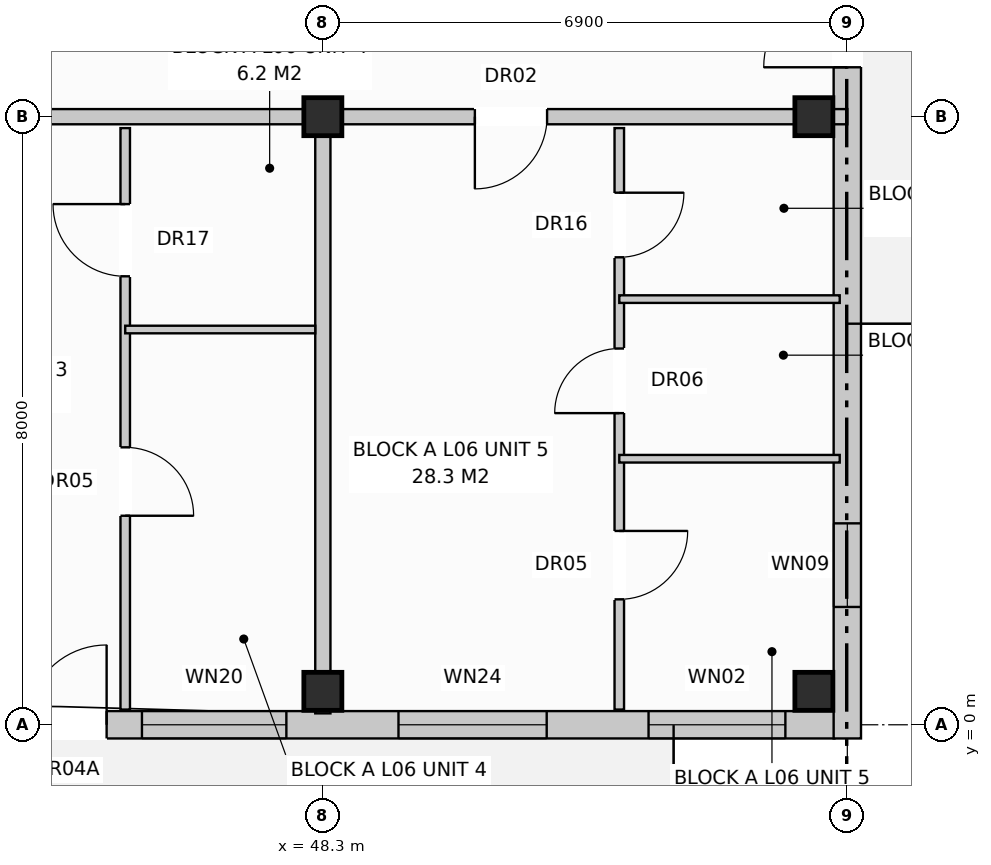
"""IFC4 building model, lengths in metres.
Left out: names, types, materials, properties, quantities, classifications, styles, units other than length and angle.
Written with IfcOpenShell. Run it as: python <this file> out.ifc"""

import sys

from ifc_helpers import new_model, si_unit, direction, frame, frame_2d, origin, origin_with_axes, origin_2d, place, context, subcontext, project, spatial, rectangle, extrude, element, fill, save


model = new_model("IFC4")
c1 = context("Model", 3, precision=1e-05, world=origin(), true_north=direction((0.0, 1.0)))
c2 = subcontext(c1, "Body", "Model", "MODEL_VIEW")
j1 = project(units=[si_unit("LENGTHUNIT", "METRE"), si_unit("PLANEANGLEUNIT", "RADIAN")], contexts=[c1])
p1 = place(None, origin())
s1 = spatial("IfcSite", under=j1, at=p1, CompositionType="ELEMENT")
p2 = place(p1, origin())
s2 = spatial("IfcBuilding", under=s1, at=p2, CompositionType="ELEMENT")
p3 = place(p2, frame((0.0, 0.0, 20.8)))
s3 = spatial("IfcBuildingStorey", under=s2, at=p3, CompositionType="ELEMENT", Elevation=20.8)
for number, where, z_axis, x_axis in (
    (1, (48.3, 0.44, 0.0), (0.0, 0.0, 1.0), (1.0, 0.0, 0.0)),
    (2, (48.3, 8.0, 0.0), (0.0, 0.0, 1.0), (1.0, 0.0, 0.0)),
    (3, (54.76, 0.44, 0.0), (0.0, 0.0, 1.0), (1.0, 0.0, 0.0)),
    (4, (54.76, 8.0, 0.0), (0.0, 0.0, 1.0), (1.0, 0.0, 0.0)),
):
    element("IfcColumn", number, at=place(p3, frame(where, z_axis=z_axis, x_axis=x_axis)), inside=s3, PredefinedType="COLUMN", context=c2, shape_type="SweptSolid", body=[
        extrude(rectangle(XDim=0.5, YDim=0.5, at=origin_2d()), origin(), (0.0, 0.0, 1.0), 3.2),
    ])
p4 = place(p3, frame((0.17, 0.0, 0.0), z_axis=(0.0, 0.0, 1.0), x_axis=(1.0, 0.0, 0.0)))
e5 = element("IfcWall", 5, at=p4, inside=s3, PredefinedType="STANDARD", context=c2, shape_type="SweptSolid", body=[
    extrude(rectangle(XDim=54.86, YDim=0.36, at=frame_2d((27.43, 0.0))), origin(), (0.0, 0.0, 1.0), 2.95),
])
p5 = place(p4, frame((4.862, 0.0, 0.0)))
e6 = element("IfcOpeningElement", 6, at=p5, cuts=e5, PredefinedType="OPENING", context=c2, shape_type="SweptSolid", body=[
    extrude(rectangle(XDim=1.05, YDim=2.12, at=frame_2d((0.525, 1.06))), frame((0.0, 0.192, 0.0), z_axis=(0.0, -1.0, 0.0), x_axis=(1.0, 0.0, 0.0)), (0.0, 0.0, 1.0), 0.384),
])
p6 = place(p4, frame((15.262, 0.0, 0.0)))
e7 = element("IfcOpeningElement", 7, at=p6, cuts=e5, PredefinedType="OPENING", context=c2, shape_type="SweptSolid", body=[
    extrude(rectangle(XDim=1.05, YDim=2.12, at=frame_2d((0.525, 1.06))), frame((0.0, 0.192, 0.0), z_axis=(0.0, -1.0, 0.0), x_axis=(1.0, 0.0, 0.0)), (0.0, 0.0, 1.0), 0.384),
])
p7 = place(p4, frame((31.362, 0.0, 0.0)))
e8 = element("IfcOpeningElement", 8, at=p7, cuts=e5, PredefinedType="OPENING", context=c2, shape_type="SweptSolid", body=[
    extrude(rectangle(XDim=1.05, YDim=2.12, at=frame_2d((0.525, 1.06))), frame((0.0, 0.192, 0.0), z_axis=(0.0, -1.0, 0.0), x_axis=(1.0, 0.0, 0.0)), (0.0, 0.0, 1.0), 0.384),
])
p8 = place(p4, frame((44.235, 0.0, 0.0)))
e9 = element("IfcOpeningElement", 9, at=p8, cuts=e5, PredefinedType="OPENING", context=c2, shape_type="SweptSolid", body=[
    extrude(rectangle(XDim=1.05, YDim=2.12, at=frame_2d((0.525, 1.06))), frame((0.0, 0.192, 0.0), z_axis=(0.0, -1.0, 0.0), x_axis=(1.0, 0.0, 0.0)), (0.0, 0.0, 1.0), 0.384),
])
p9 = place(p4, frame((2.1, 0.0, 0.8)))
e10 = element("IfcOpeningElement", 10, at=p9, cuts=e5, PredefinedType="OPENING", context=c2, shape_type="SweptSolid", body=[
    extrude(rectangle(XDim=1.8, YDim=1.7, at=frame_2d((0.9, 0.85))), frame((0.0, 0.192, 0.0), z_axis=(0.0, -1.0, 0.0), x_axis=(1.0, 0.0, 0.0)), (0.0, 0.0, 1.0), 0.384),
])
p10 = place(p4, frame((7.75, 0.0, 0.72)))
e11 = element("IfcOpeningElement", 11, at=p10, cuts=e5, PredefinedType="OPENING", context=c2, shape_type="SweptSolid", body=[
    extrude(rectangle(XDim=1.9, YDim=1.85, at=frame_2d((0.95, 0.925))), frame((0.0, 0.192, 0.0), z_axis=(0.0, -1.0, 0.0), x_axis=(1.0, 0.0, 0.0)), (0.0, 0.0, 1.0), 0.384),
])
p11 = place(p4, frame((11.8, 0.0, 0.72)))
e12 = element("IfcOpeningElement", 12, at=p11, cuts=e5, PredefinedType="OPENING", context=c2, shape_type="SweptSolid", body=[
    extrude(rectangle(XDim=1.1, YDim=1.5, at=frame_2d((0.55, 0.75))), frame((0.0, 0.192, 0.0), z_axis=(0.0, -1.0, 0.0), x_axis=(1.0, 0.0, 0.0)), (0.0, 0.0, 1.0), 0.384),
])
p12 = place(p4, frame((17.6, 0.0, 0.8)))
e13 = element("IfcOpeningElement", 13, at=p12, cuts=e5, PredefinedType="OPENING", context=c2, shape_type="SweptSolid", body=[
    extrude(rectangle(XDim=1.8, YDim=1.7, at=frame_2d((0.9, 0.85))), frame((0.0, 0.192, 0.0), z_axis=(0.0, -1.0, 0.0), x_axis=(1.0, 0.0, 0.0)), (0.0, 0.0, 1.0), 0.384),
])
p13 = place(p4, frame((21.55, 0.0, 0.72)))
e14 = element("IfcOpeningElement", 14, at=p13, cuts=e5, PredefinedType="OPENING", context=c2, shape_type="SweptSolid", body=[
    extrude(rectangle(XDim=1.9, YDim=1.85, at=frame_2d((0.95, 0.925))), frame((0.0, 0.192, 0.0), z_axis=(0.0, -1.0, 0.0), x_axis=(1.0, 0.0, 0.0)), (0.0, 0.0, 1.0), 0.384),
])
p14 = place(p4, frame((25.35, 0.0, 0.72)))
e15 = element("IfcOpeningElement", 15, at=p14, cuts=e5, PredefinedType="OPENING", context=c2, shape_type="SweptSolid", body=[
    extrude(rectangle(XDim=1.1, YDim=1.5, at=frame_2d((0.55, 0.75))), frame((0.0, 0.192, 0.0), z_axis=(0.0, -1.0, 0.0), x_axis=(1.0, 0.0, 0.0)), (0.0, 0.0, 1.0), 0.384),
])
p15 = place(p4, frame((29.2, 0.0, 0.8)))
e16 = element("IfcOpeningElement", 16, at=p15, cuts=e5, PredefinedType="OPENING", context=c2, shape_type="SweptSolid", body=[
    extrude(rectangle(XDim=1.8, YDim=1.7, at=frame_2d((0.9, 0.85))), frame((0.0, 0.192, 0.0), z_axis=(0.0, -1.0, 0.0), x_axis=(1.0, 0.0, 0.0)), (0.0, 0.0, 1.0), 0.384),
])
p16 = place(p4, frame((34.833, 0.0, 0.72)))
e17 = element("IfcOpeningElement", 17, at=p16, cuts=e5, PredefinedType="OPENING", context=c2, shape_type="SweptSolid", body=[
    extrude(rectangle(XDim=1.9, YDim=1.85, at=frame_2d((0.95, 0.925))), frame((0.0, 0.192, 0.0), z_axis=(0.0, -1.0, 0.0), x_axis=(1.0, 0.0, 0.0)), (0.0, 0.0, 1.0), 0.384),
])
p17 = place(p4, frame((38.025, 0.0, 0.8)))
e18 = element("IfcOpeningElement", 18, at=p17, cuts=e5, PredefinedType="OPENING", context=c2, shape_type="SweptSolid", body=[
    extrude(rectangle(XDim=1.95, YDim=1.65, at=frame_2d((0.975, 0.825))), frame((0.0, 0.192, 0.0), z_axis=(0.0, -1.0, 0.0), x_axis=(1.0, 0.0, 0.0)), (0.0, 0.0, 1.0), 0.384),
])
p18 = place(p4, frame((42.1, 0.0, 0.8)))
e19 = element("IfcOpeningElement", 19, at=p18, cuts=e5, PredefinedType="OPENING", context=c2, shape_type="SweptSolid", body=[
    extrude(rectangle(XDim=1.8, YDim=1.7, at=frame_2d((0.9, 0.85))), frame((0.0, 0.192, 0.0), z_axis=(0.0, -1.0, 0.0), x_axis=(1.0, 0.0, 0.0)), (0.0, 0.0, 1.0), 0.384),
])
p19 = place(p4, frame((45.75, 0.0, 0.72)))
e20 = element("IfcOpeningElement", 20, at=p19, cuts=e5, PredefinedType="OPENING", context=c2, shape_type="SweptSolid", body=[
    extrude(rectangle(XDim=1.9, YDim=1.85, at=frame_2d((0.95, 0.925))), frame((0.0, 0.192, 0.0), z_axis=(0.0, -1.0, 0.0), x_axis=(1.0, 0.0, 0.0)), (0.0, 0.0, 1.0), 0.384),
])
p20 = place(p4, frame((49.125, 0.0, 0.8)))
e21 = element("IfcOpeningElement", 21, at=p20, cuts=e5, PredefinedType="OPENING", context=c2, shape_type="SweptSolid", body=[
    extrude(rectangle(XDim=1.95, YDim=1.65, at=frame_2d((0.975, 0.825))), frame((0.0, 0.192, 0.0), z_axis=(0.0, -1.0, 0.0), x_axis=(1.0, 0.0, 0.0)), (0.0, 0.0, 1.0), 0.384),
])
p21 = place(p4, frame((52.415, 0.0, 0.8)))
e22 = element("IfcOpeningElement", 22, at=p21, cuts=e5, PredefinedType="OPENING", context=c2, shape_type="SweptSolid", body=[
    extrude(rectangle(XDim=1.8, YDim=1.7, at=frame_2d((0.9, 0.85))), frame((0.0, 0.192, 0.0), z_axis=(0.0, -1.0, 0.0), x_axis=(1.0, 0.0, 0.0)), (0.0, 0.0, 1.0), 0.384),
])
p22 = place(p3, frame((55.2, -0.18, 0.0), z_axis=(0.0, 0.0, 1.0), x_axis=(0.0, 1.0, 0.0)))
e23 = element("IfcWall", 23, at=p22, inside=s3, PredefinedType="STANDARD", context=c2, shape_type="SweptSolid", body=[
    extrude(rectangle(XDim=18.76, YDim=0.36, at=frame_2d((9.38, 0.0))), origin(), (0.0, 0.0, 1.0), 2.95),
])
p23 = place(p22, frame((8.83, 0.0, 0.0)))
e24 = element("IfcOpeningElement", 24, at=p23, cuts=e23, PredefinedType="OPENING", context=c2, shape_type="SweptSolid", body=[
    extrude(rectangle(XDim=1.1, YDim=2.1, at=frame_2d((0.55, 1.05))), frame((0.0, 0.192, 0.0), z_axis=(0.0, -1.0, 0.0), x_axis=(1.0, 0.0, 0.0)), (0.0, 0.0, 1.0), 0.384),
])
p24 = place(p22, frame((1.73, 0.0, 0.72)))
e25 = element("IfcOpeningElement", 25, at=p24, cuts=e23, PredefinedType="OPENING", context=c2, shape_type="SweptSolid", body=[
    extrude(rectangle(XDim=1.1, YDim=1.5, at=frame_2d((0.55, 0.75))), frame((0.0, 0.192, 0.0), z_axis=(0.0, -1.0, 0.0), x_axis=(1.0, 0.0, 0.0)), (0.0, 0.0, 1.0), 0.384),
])
p25 = place(p22, frame((15.93, 0.0, 0.72)))
e26 = element("IfcOpeningElement", 26, at=p25, cuts=e23, PredefinedType="OPENING", context=c2, shape_type="SweptSolid", body=[
    extrude(rectangle(XDim=1.1, YDim=1.5, at=frame_2d((0.55, 0.75))), frame((0.0, 0.192, 0.0), z_axis=(0.0, -1.0, 0.0), x_axis=(1.0, 0.0, 0.0)), (0.0, 0.0, 1.0), 0.384),
])
p26 = place(p3, frame((48.3, 7.85, 0.0), z_axis=(0.0, 0.0, 1.0), x_axis=(0.0, -1.0, 0.0)))
e27 = element("IfcWall", 27, at=p26, inside=s3, PredefinedType="PARTITIONING", context=c2, shape_type="SweptSolid", body=[
    extrude(rectangle(XDim=7.7, YDim=0.2, at=frame_2d((3.85, 0.0))), origin(), (0.0, 0.0, 1.0), 2.39),
])
p27 = place(p3, frame((41.4, 8.0, 0.0), z_axis=(0.0, 0.0, 1.0), x_axis=(1.0, 0.0, 0.0)))
e28 = element("IfcWall", 28, at=p27, inside=s3, PredefinedType="PARTITIONING", context=c2, shape_type="SweptSolid", body=[
    extrude(rectangle(XDim=6.9, YDim=0.2, at=frame_2d((3.45, 0.0))), origin(), (0.0, 0.0, 1.0), 2.39),
])
p28 = place(p27, frame((2.0, 0.0, 0.0)))
e29 = element("IfcOpeningElement", 29, at=p28, cuts=e28, PredefinedType="OPENING", context=c2, shape_type="SweptSolid", body=[
    extrude(rectangle(XDim=0.95, YDim=2.15, at=frame_2d((0.475, 1.075))), frame((0.0, 0.112, 0.0), z_axis=(0.0, -1.0, 0.0), x_axis=(1.0, 0.0, 0.0)), (0.0, 0.0, 1.0), 0.224),
])
p29 = place(p3, frame((45.7, 7.85, 0.0), z_axis=(0.0, 0.0, 1.0), x_axis=(0.0, -1.0, 0.0)))
e30 = element("IfcWall", 30, at=p29, inside=s3, PredefinedType="PARTITIONING", context=c2, shape_type="SweptSolid", body=[
    extrude(rectangle(XDim=7.65, YDim=0.125, at=frame_2d((3.825, 0.0))), origin(), (0.0, 0.0, 1.0), 2.95),
])
p30 = place(p29, frame((1.0, 0.0, 0.0)))
e31 = element("IfcOpeningElement", 31, at=p30, cuts=e30, PredefinedType="OPENING", context=c2, shape_type="SweptSolid", body=[
    extrude(rectangle(XDim=0.95, YDim=2.1, at=frame_2d((0.475, 1.05))), frame((0.0, 0.074, 0.0), z_axis=(0.0, -1.0, 0.0), x_axis=(1.0, 0.0, 0.0)), (0.0, 0.0, 1.0), 0.149),
])
p31 = place(p29, frame((4.2, 0.0, 0.0)))
e32 = element("IfcOpeningElement", 32, at=p31, cuts=e30, PredefinedType="OPENING", context=c2, shape_type="SweptSolid", body=[
    extrude(rectangle(XDim=0.9, YDim=2.1, at=frame_2d((0.45, 1.05))), frame((0.0, 0.074, 0.0), z_axis=(0.0, -1.0, 0.0), x_axis=(1.0, 0.0, 0.0)), (0.0, 0.0, 1.0), 0.149),
])
p32 = place(p3, frame((45.7, 5.2, 0.0), z_axis=(0.0, 0.0, 1.0), x_axis=(1.0, 0.0, 0.0)))
e33 = element("IfcWall", 33, at=p32, inside=s3, PredefinedType="PARTITIONING", context=c2, shape_type="SweptSolid", body=[
    extrude(rectangle(XDim=2.5, YDim=0.1, at=frame_2d((1.25, 0.0))), origin(), (0.0, 0.0, 1.0), 2.95),
])
p33 = place(p3, frame((48.3, 8.0, 0.0), z_axis=(0.0, 0.0, 1.0), x_axis=(1.0, 0.0, 0.0)))
e34 = element("IfcWall", 34, at=p33, inside=s3, PredefinedType="PARTITIONING", context=c2, shape_type="SweptSolid", body=[
    extrude(rectangle(XDim=6.9, YDim=0.2, at=frame_2d((3.45, 0.0))), origin(), (0.0, 0.0, 1.0), 2.39),
])
p34 = place(p33, frame((2.0, 0.0, 0.0)))
e35 = element("IfcOpeningElement", 35, at=p34, cuts=e34, PredefinedType="OPENING", context=c2, shape_type="SweptSolid", body=[
    extrude(rectangle(XDim=0.95, YDim=2.15, at=frame_2d((0.475, 1.075))), frame((0.0, 0.112, 0.0), z_axis=(0.0, -1.0, 0.0), x_axis=(1.0, 0.0, 0.0)), (0.0, 0.0, 1.0), 0.224),
])
p35 = place(p3, frame((52.2, 7.85, 0.0), z_axis=(0.0, 0.0, 1.0), x_axis=(0.0, -1.0, 0.0)))
e36 = element("IfcWall", 36, at=p35, inside=s3, PredefinedType="PARTITIONING", context=c2, shape_type="SweptSolid", body=[
    extrude(rectangle(XDim=7.65, YDim=0.125, at=frame_2d((3.825, 0.0))), origin(), (0.0, 0.0, 1.0), 2.59),
])
p36 = place(p35, frame((0.85, 0.0, 0.0)))
e37 = element("IfcOpeningElement", 37, at=p36, cuts=e36, PredefinedType="OPENING", context=c2, shape_type="SweptSolid", body=[
    extrude(rectangle(XDim=0.85, YDim=2.1, at=frame_2d((0.425, 1.05))), frame((0.0, 0.074, 0.0), z_axis=(0.0, -1.0, 0.0), x_axis=(1.0, 0.0, 0.0)), (0.0, 0.0, 1.0), 0.149),
])
p37 = place(p35, frame((2.9, 0.0, 0.0)))
e38 = element("IfcOpeningElement", 38, at=p37, cuts=e36, PredefinedType="OPENING", context=c2, shape_type="SweptSolid", body=[
    extrude(rectangle(XDim=0.85, YDim=2.05, at=frame_2d((0.425, 1.025))), frame((0.0, 0.074, 0.0), z_axis=(0.0, -1.0, 0.0), x_axis=(1.0, 0.0, 0.0)), (0.0, 0.0, 1.0), 0.149),
])
p38 = place(p35, frame((5.3, 0.0, 0.0)))
e39 = element("IfcOpeningElement", 39, at=p38, cuts=e36, PredefinedType="OPENING", context=c2, shape_type="SweptSolid", body=[
    extrude(rectangle(XDim=0.9, YDim=2.1, at=frame_2d((0.45, 1.05))), frame((0.0, 0.074, 0.0), z_axis=(0.0, -1.0, 0.0), x_axis=(1.0, 0.0, 0.0)), (0.0, 0.0, 1.0), 0.149),
])
for number, where, z_axis, x_axis in (
    (40, (52.2, 5.6, 0.0), (0.0, 0.0, 1.0), (1.0, 0.0, 0.0)),
    (41, (52.2, 3.5, 0.0), (0.0, 0.0, 1.0), (1.0, 0.0, 0.0)),
):
    element("IfcWall", number, at=place(p3, frame(where, z_axis=z_axis, x_axis=x_axis)), inside=s3, PredefinedType="PARTITIONING", context=c2, shape_type="SweptSolid", body=[
        extrude(rectangle(XDim=2.9, YDim=0.1, at=frame_2d((1.45, 0.0))), origin(), (0.0, 0.0, 1.0), 2.95),
    ])
p39 = place(p8, origin_with_axes())
e42 = element("IfcDoor", 42, at=p39, inside=s3, OperationType="SINGLE_SWING_RIGHT", PredefinedType="DOOR", context=c2, shape_type="SweptSolid", body=[
    extrude(rectangle(XDim=1.05, YDim=2.12, at=frame_2d((0.525, 1.06))), frame((0.0, 0.025, 0.0), z_axis=(0.0, -1.0, 0.0), x_axis=(1.0, 0.0, 0.0)), (0.0, 0.0, 1.0), 0.05),
])
fill(e9, e42)
p40 = place(p19, origin_with_axes())
e43 = element("IfcWindow", 43, at=p40, inside=s3, PartitioningType="SINGLE_PANEL", PredefinedType="WINDOW", context=c2, shape_type="SweptSolid", body=[
    extrude(rectangle(XDim=1.9, YDim=1.85, at=frame_2d((0.95, 0.925))), frame((0.0, 0.03, 0.0), z_axis=(0.0, -1.0, 0.0), x_axis=(1.0, 0.0, 0.0)), (0.0, 0.0, 1.0), 0.06),
])
fill(e20, e43)
p41 = place(p20, origin_with_axes())
e44 = element("IfcWindow", 44, at=p41, inside=s3, PartitioningType="SINGLE_PANEL", PredefinedType="WINDOW", context=c2, shape_type="SweptSolid", body=[
    extrude(rectangle(XDim=1.95, YDim=1.65, at=frame_2d((0.975, 0.825))), frame((0.0, 0.03, 0.0), z_axis=(0.0, -1.0, 0.0), x_axis=(1.0, 0.0, 0.0)), (0.0, 0.0, 1.0), 0.06),
])
fill(e21, e44)
p42 = place(p21, origin_with_axes())
e45 = element("IfcWindow", 45, at=p42, inside=s3, PartitioningType="SINGLE_PANEL", PredefinedType="WINDOW", context=c2, shape_type="SweptSolid", body=[
    extrude(rectangle(XDim=1.8, YDim=1.7, at=frame_2d((0.9, 0.85))), frame((0.0, 0.03, 0.0), z_axis=(0.0, -1.0, 0.0), x_axis=(1.0, 0.0, 0.0)), (0.0, 0.0, 1.0), 0.06),
])
fill(e22, e45)
p43 = place(p23, origin_with_axes())
e46 = element("IfcDoor", 46, at=p43, inside=s3, OperationType="SINGLE_SWING_LEFT", PredefinedType="DOOR", context=c2, shape_type="SweptSolid", body=[
    extrude(rectangle(XDim=1.1, YDim=2.1, at=frame_2d((0.55, 1.05))), frame((0.0, 0.025, 0.0), z_axis=(0.0, -1.0, 0.0), x_axis=(1.0, 0.0, 0.0)), (0.0, 0.0, 1.0), 0.05),
])
fill(e24, e46)
p44 = place(p24, origin_with_axes())
e47 = element("IfcWindow", 47, at=p44, inside=s3, PartitioningType="SINGLE_PANEL", PredefinedType="WINDOW", context=c2, shape_type="SweptSolid", body=[
    extrude(rectangle(XDim=1.1, YDim=1.5, at=frame_2d((0.55, 0.75))), frame((0.0, 0.03, 0.0), z_axis=(0.0, -1.0, 0.0), x_axis=(1.0, 0.0, 0.0)), (0.0, 0.0, 1.0), 0.06),
])
fill(e25, e47)
p45 = place(p30, frame((0.95, 0.0, 0.0), z_axis=(0.0, 0.0, 1.0), x_axis=(-1.0, 0.0, 0.0)))
e48 = element("IfcDoor", 48, at=p45, inside=s3, OperationType="SINGLE_SWING_LEFT", PredefinedType="DOOR", context=c2, shape_type="SweptSolid", body=[
    extrude(rectangle(XDim=0.95, YDim=2.1, at=frame_2d((0.475, 1.05))), frame((0.0, 0.025, 0.0), z_axis=(0.0, -1.0, 0.0), x_axis=(1.0, 0.0, 0.0)), (0.0, 0.0, 1.0), 0.05),
])
fill(e31, e48)
p46 = place(p31, origin_with_axes())
e49 = element("IfcDoor", 49, at=p46, inside=s3, OperationType="SINGLE_SWING_RIGHT", PredefinedType="DOOR", context=c2, shape_type="SweptSolid", body=[
    extrude(rectangle(XDim=0.9, YDim=2.1, at=frame_2d((0.45, 1.05))), frame((0.0, 0.025, 0.0), z_axis=(0.0, -1.0, 0.0), x_axis=(1.0, 0.0, 0.0)), (0.0, 0.0, 1.0), 0.05),
])
fill(e32, e49)
p47 = place(p34, frame((0.95, 0.0, 0.0), z_axis=(0.0, 0.0, 1.0), x_axis=(-1.0, 0.0, 0.0)))
e50 = element("IfcDoor", 50, at=p47, inside=s3, OperationType="SINGLE_SWING_LEFT", PredefinedType="DOOR", context=c2, shape_type="SweptSolid", body=[
    extrude(rectangle(XDim=0.95, YDim=2.15, at=frame_2d((0.475, 1.075))), frame((0.0, 0.025, 0.0), z_axis=(0.0, -1.0, 0.0), x_axis=(1.0, 0.0, 0.0)), (0.0, 0.0, 1.0), 0.05),
])
fill(e35, e50)
p48 = place(p36, origin_with_axes())
e51 = element("IfcDoor", 51, at=p48, inside=s3, OperationType="SINGLE_SWING_LEFT", PredefinedType="DOOR", context=c2, shape_type="SweptSolid", body=[
    extrude(rectangle(XDim=0.85, YDim=2.1, at=frame_2d((0.425, 1.05))), frame((0.0, 0.025, 0.0), z_axis=(0.0, -1.0, 0.0), x_axis=(1.0, 0.0, 0.0)), (0.0, 0.0, 1.0), 0.05),
])
fill(e37, e51)
p49 = place(p37, frame((0.85, 0.0, 0.0), z_axis=(0.0, 0.0, 1.0), x_axis=(-1.0, 0.0, 0.0)))
e52 = element("IfcDoor", 52, at=p49, inside=s3, OperationType="SINGLE_SWING_RIGHT", PredefinedType="DOOR", context=c2, shape_type="SweptSolid", body=[
    extrude(rectangle(XDim=0.85, YDim=2.05, at=frame_2d((0.425, 1.025))), frame((0.0, 0.025, 0.0), z_axis=(0.0, -1.0, 0.0), x_axis=(1.0, 0.0, 0.0)), (0.0, 0.0, 1.0), 0.05),
])
fill(e38, e52)
p50 = place(p38, origin_with_axes())
e53 = element("IfcDoor", 53, at=p50, inside=s3, OperationType="SINGLE_SWING_LEFT", PredefinedType="DOOR", context=c2, shape_type="SweptSolid", body=[
    extrude(rectangle(XDim=0.9, YDim=2.1, at=frame_2d((0.45, 1.05))), frame((0.0, 0.025, 0.0), z_axis=(0.0, -1.0, 0.0), x_axis=(1.0, 0.0, 0.0)), (0.0, 0.0, 1.0), 0.05),
])
fill(e39, e53)
save(model, sys.argv[1])
